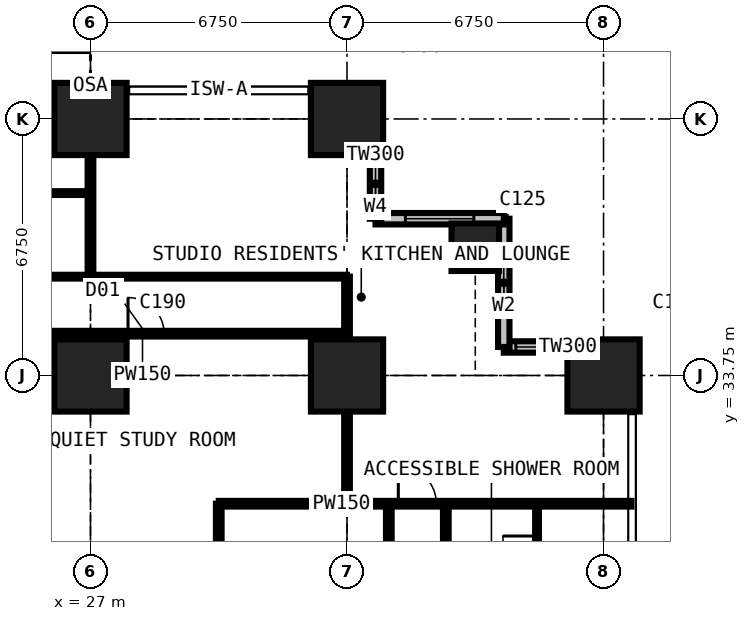
"""IFC4 building model, lengths in metres.
Left out: names, types, materials, properties, quantities, classifications, styles, units other than length and angle.
Written with IfcOpenShell. Run it as: python <this file> out.ifc"""

import sys

from ifc_helpers import new_model, si_unit, direction, frame, frame_2d, origin, origin_2d, place, context, subcontext, project, spatial, rectangle, extrude, element, fill, save


model = new_model("IFC4")
c1 = context("Model", 3, precision=1e-05, world=origin(), true_north=direction((0.0, 1.0)))
c2 = subcontext(c1, "Body", "Model", "MODEL_VIEW")
j1 = project(units=[si_unit("LENGTHUNIT", "METRE"), si_unit("PLANEANGLEUNIT", "RADIAN")], contexts=[c1])
p1 = place(None, origin())
s1 = spatial("IfcSite", under=j1, at=p1, CompositionType="ELEMENT")
p2 = place(p1, origin())
s2 = spatial("IfcBuilding", under=s1, at=p2, CompositionType="ELEMENT")
p3 = place(p2, frame((0.0, 0.0, 39.6)))
s3 = spatial("IfcBuildingStorey", under=s2, at=p3, CompositionType="ELEMENT", Elevation=39.6)
for number, where, z_axis, x_axis in (
    (1, (27.0, 33.75, 0.0), (0.0, 0.0, 1.0), (1.0, 0.0, 0.0)),
    (2, (27.0, 40.5, 0.0), (0.0, 0.0, 1.0), (1.0, 0.0, 0.0)),
    (3, (33.75, 33.75, 0.0), (0.0, 0.0, 1.0), (1.0, 0.0, 0.0)),
    (4, (33.75, 40.5, 0.0), (0.0, 0.0, 1.0), (1.0, 0.0, 0.0)),
):
    element("IfcColumn", number, at=place(p3, frame(where, z_axis=z_axis, x_axis=x_axis)), inside=s3, PredefinedType="COLUMN", context=c2, shape_type="SweptSolid", body=[
        extrude(rectangle(XDim=1.9, YDim=1.9, at=origin_2d()), origin(), (0.0, 0.0, 1.0), 3.6),
    ])
p4 = place(p3, frame((37.125, 37.125, 0.0), z_axis=(0.0, 0.0, 1.0), x_axis=(1.0, 0.0, 0.0)))
e5 = element("IfcColumn", 5, at=p4, inside=s3, PredefinedType="COLUMN", context=c2, shape_type="SweptSolid", body=[
    extrude(rectangle(XDim=1.25, YDim=1.25, at=origin_2d()), origin(), (0.0, 0.0, 1.0), 3.6),
])
p5 = place(p3, frame((40.5, 33.75, 0.0), z_axis=(0.0, 0.0, 1.0), x_axis=(1.0, 0.0, 0.0)))
e6 = element("IfcColumn", 6, at=p5, inside=s3, PredefinedType="COLUMN", context=c2, shape_type="SweptSolid", body=[
    extrude(rectangle(XDim=1.9, YDim=1.9, at=origin_2d()), origin(), (0.0, 0.0, 1.0), 3.6),
])
p6 = place(p3, frame((41.25, 34.5, 0.0), z_axis=(0.0, 0.0, 1.0), x_axis=(-1.0, 0.0, 0.0)))
e7 = element("IfcWall", 7, at=p6, inside=s3, PredefinedType="SOLIDWALL", context=c2, shape_type="SweptSolid", body=[
    extrude(rectangle(XDim=3.375, YDim=0.3, at=frame_2d((1.688, 0.0))), origin(), (0.0, 0.0, 1.0), 3.375),
])
p7 = place(p6, frame((1.857, 0.0, 0.9)))
e8 = element("IfcOpeningElement", 8, at=p7, cuts=e7, PredefinedType="OPENING", context=c2, shape_type="SweptSolid", body=[
    extrude(rectangle(XDim=1.2, YDim=1.8, at=frame_2d((0.6, 0.9))), frame((0.0, 0.16, 0.0), z_axis=(0.0, -1.0, 0.0), x_axis=(1.0, 0.0, 0.0)), (0.0, 0.0, 1.0), 0.32),
])
p8 = place(p3, frame((37.875, 34.5, 0.0), z_axis=(0.0, 0.0, 1.0), x_axis=(0.0, 1.0, 0.0)))
e9 = element("IfcWall", 9, at=p8, inside=s3, PredefinedType="SOLIDWALL", context=c2, shape_type="SweptSolid", body=[
    extrude(rectangle(XDim=3.375, YDim=0.3, at=frame_2d((1.688, 0.0))), origin(), (0.0, 0.0, 1.0), 3.375),
])
p9 = place(p8, frame((0.788, 0.0, 0.6)))
e10 = element("IfcOpeningElement", 10, at=p9, cuts=e9, PredefinedType="OPENING", context=c2, shape_type="SweptSolid", body=[
    extrude(rectangle(XDim=1.8, YDim=2.1, at=frame_2d((0.9, 1.05))), frame((0.0, 0.16, 0.0), z_axis=(0.0, -1.0, 0.0), x_axis=(1.0, 0.0, 0.0)), (0.0, 0.0, 1.0), 0.32),
])
p10 = place(p3, frame((37.875, 37.875, 0.0), z_axis=(0.0, 0.0, 1.0), x_axis=(-1.0, 0.0, 0.0)))
e11 = element("IfcWall", 11, at=p10, inside=s3, PredefinedType="SOLIDWALL", context=c2, shape_type="SweptSolid", body=[
    extrude(rectangle(XDim=3.375, YDim=0.3, at=frame_2d((1.688, 0.0))), origin(), (0.0, 0.0, 1.0), 3.375),
])
p11 = place(p10, frame((0.788, 0.0, 0.6)))
e12 = element("IfcOpeningElement", 12, at=p11, cuts=e11, PredefinedType="OPENING", context=c2, shape_type="SweptSolid", body=[
    extrude(rectangle(XDim=1.8, YDim=2.1, at=frame_2d((0.9, 1.05))), frame((0.0, 0.16, 0.0), z_axis=(0.0, -1.0, 0.0), x_axis=(1.0, 0.0, 0.0)), (0.0, 0.0, 1.0), 0.32),
])
p12 = place(p3, frame((34.5, 37.875, 0.0), z_axis=(0.0, 0.0, 1.0), x_axis=(0.0, 1.0, 0.0)))
e13 = element("IfcWall", 13, at=p12, inside=s3, PredefinedType="SOLIDWALL", context=c2, shape_type="SweptSolid", body=[
    extrude(rectangle(XDim=3.375, YDim=0.3, at=frame_2d((1.688, 0.0))), origin(), (0.0, 0.0, 1.0), 3.375),
])
p13 = place(p12, frame((0.317, 0.0, 0.9)))
e14 = element("IfcOpeningElement", 14, at=p13, cuts=e13, PredefinedType="OPENING", context=c2, shape_type="SweptSolid", body=[
    extrude(rectangle(XDim=1.2, YDim=1.8, at=frame_2d((0.6, 0.9))), frame((0.0, 0.16, 0.0), z_axis=(0.0, -1.0, 0.0), x_axis=(1.0, 0.0, 0.0)), (0.0, 0.0, 1.0), 0.32),
])
p14 = place(p3, frame((10.125, 36.35, 0.0), z_axis=(0.0, 0.0, 1.0), x_axis=(1.0, 0.0, 0.0)))
e15 = element("IfcWall", 15, at=p14, inside=s3, PredefinedType="PARTITIONING", context=c2, shape_type="SweptSolid", body=[
    extrude(rectangle(XDim=23.625, YDim=0.1, at=frame_2d((11.812, 0.0))), origin(), (0.0, 0.0, 1.0), 3.375),
])
p15 = place(p14, frame((0.2, 0.0, 0.0)))
e16 = element("IfcOpeningElement", 16, at=p15, cuts=e15, PredefinedType="OPENING", context=c2, shape_type="SweptSolid", body=[
    extrude(rectangle(XDim=0.95, YDim=2.2, at=frame_2d((0.475, 1.1))), frame((0.0, 0.06, 0.0), z_axis=(0.0, -1.0, 0.0), x_axis=(1.0, 0.0, 0.0)), (0.0, 0.0, 1.0), 0.12),
])
p16 = place(p14, frame((3.625, 0.0, 0.0)))
e17 = element("IfcOpeningElement", 17, at=p16, cuts=e15, PredefinedType="OPENING", context=c2, shape_type="SweptSolid", body=[
    extrude(rectangle(XDim=0.95, YDim=2.2, at=frame_2d((0.475, 1.1))), frame((0.0, 0.06, 0.0), z_axis=(0.0, -1.0, 0.0), x_axis=(1.0, 0.0, 0.0)), (0.0, 0.0, 1.0), 0.12),
])
p17 = place(p14, frame((7.0, 0.0, 0.0)))
e18 = element("IfcOpeningElement", 18, at=p17, cuts=e15, PredefinedType="OPENING", context=c2, shape_type="SweptSolid", body=[
    extrude(rectangle(XDim=0.95, YDim=2.2, at=frame_2d((0.475, 1.1))), frame((0.0, 0.06, 0.0), z_axis=(0.0, -1.0, 0.0), x_axis=(1.0, 0.0, 0.0)), (0.0, 0.0, 1.0), 0.12),
])
p18 = place(p14, frame((10.375, 0.0, 0.0)))
e19 = element("IfcOpeningElement", 19, at=p18, cuts=e15, PredefinedType="OPENING", context=c2, shape_type="SweptSolid", body=[
    extrude(rectangle(XDim=0.95, YDim=2.2, at=frame_2d((0.475, 1.1))), frame((0.0, 0.06, 0.0), z_axis=(0.0, -1.0, 0.0), x_axis=(1.0, 0.0, 0.0)), (0.0, 0.0, 1.0), 0.12),
])
p19 = place(p14, frame((13.75, 0.0, 0.0)))
e20 = element("IfcOpeningElement", 20, at=p19, cuts=e15, PredefinedType="OPENING", context=c2, shape_type="SweptSolid", body=[
    extrude(rectangle(XDim=0.95, YDim=2.2, at=frame_2d((0.475, 1.1))), frame((0.0, 0.06, 0.0), z_axis=(0.0, -1.0, 0.0), x_axis=(1.0, 0.0, 0.0)), (0.0, 0.0, 1.0), 0.12),
])
p20 = place(p3, frame((22.988, 34.85, 0.0), z_axis=(0.0, 0.0, 1.0), x_axis=(1.0, 0.0, 0.0)))
e21 = element("IfcWall", 21, at=p20, inside=s3, PredefinedType="PARTITIONING", context=c2, shape_type="SweptSolid", body=[
    extrude(rectangle(XDim=10.762, YDim=0.15, at=frame_2d((5.381, 0.0))), origin(), (0.0, 0.0, 1.0), 3.375),
])
p21 = place(p20, frame((5.0, 0.0, 0.0)))
e22 = element("IfcOpeningElement", 22, at=p21, cuts=e21, PredefinedType="OPENING", context=c2, shape_type="SweptSolid", body=[
    extrude(rectangle(XDim=0.95, YDim=2.2, at=frame_2d((0.475, 1.1))), frame((0.0, 0.085, 0.0), z_axis=(0.0, -1.0, 0.0), x_axis=(1.0, 0.0, 0.0)), (0.0, 0.0, 1.0), 0.17),
])
p22 = place(p3, frame((25.0, 38.55, 0.0), z_axis=(0.0, 0.0, 1.0), x_axis=(1.0, 0.0, 0.0)))
e23 = element("IfcWall", 23, at=p22, inside=s3, PredefinedType="PARTITIONING", context=c2, shape_type="SweptSolid", body=[
    extrude(rectangle(XDim=2.0, YDim=0.1, at=frame_2d((1.0, 0.0))), origin(), (0.0, 0.0, 1.0), 3.375),
])
p23 = place(p3, frame((27.0, 36.35, 0.0), z_axis=(0.0, 0.0, 1.0), x_axis=(0.0, 1.0, 0.0)))
e24 = element("IfcWall", 24, at=p23, inside=s3, PredefinedType="PARTITIONING", context=c2, shape_type="SweptSolid", body=[
    extrude(rectangle(XDim=4.884, YDim=0.15, at=frame_2d((2.442, 0.0))), origin(), (0.0, 0.0, 1.0), 2.61),
])
p24 = place(p3, frame((30.375, 29.2, 0.0), z_axis=(0.0, 0.0, 1.0), x_axis=(0.0, 1.0, 0.0)))
e25 = element("IfcWall", 25, at=p24, inside=s3, PredefinedType="PARTITIONING", context=c2, shape_type="SweptSolid", body=[
    extrude(rectangle(XDim=1.175, YDim=0.15, at=frame_2d((0.587, 0.0))), origin(), (0.0, 0.0, 1.0), 3.375),
])
p25 = place(p3, frame((30.375, 30.375, 0.0), z_axis=(0.0, 0.0, 1.0), x_axis=(1.0, 0.0, 0.0)))
e26 = element("IfcWall", 26, at=p25, inside=s3, PredefinedType="PARTITIONING", context=c2, shape_type="SweptSolid", body=[
    extrude(rectangle(XDim=10.859, YDim=0.15, at=frame_2d((5.429, 0.0))), origin(), (0.0, 0.0, 1.0), 3.375),
])
p26 = place(p25, frame((4.725, 0.0, 0.0)))
e27 = element("IfcOpeningElement", 27, at=p26, cuts=e26, PredefinedType="OPENING", context=c2, shape_type="SweptSolid", body=[
    extrude(rectangle(XDim=1.0, YDim=2.2, at=frame_2d((0.5, 1.1))), frame((0.0, 0.085, 0.0), z_axis=(0.0, -1.0, 0.0), x_axis=(1.0, 0.0, 0.0)), (0.0, 0.0, 1.0), 0.17),
])
p27 = place(p3, frame((33.75, 30.375, 0.0), z_axis=(0.0, 0.0, 1.0), x_axis=(0.0, 1.0, 0.0)))
e28 = element("IfcWall", 28, at=p27, inside=s3, PredefinedType="PARTITIONING", context=c2, shape_type="SweptSolid", body=[
    extrude(rectangle(XDim=5.975, YDim=0.15, at=frame_2d((2.988, 0.0))), origin(), (0.0, 0.0, 1.0), 2.877),
])
p28 = place(p3, frame((34.85, 12.55, 0.0), z_axis=(0.0, 0.0, 1.0), x_axis=(0.0, 1.0, 0.0)))
e29 = element("IfcWall", 29, at=p28, inside=s3, PredefinedType="PARTITIONING", context=c2, shape_type="SweptSolid", body=[
    extrude(rectangle(XDim=17.825, YDim=0.15, at=frame_2d((8.913, 0.0))), origin(), (0.0, 0.0, 1.0), 3.375),
])
p29 = place(p28, frame((8.65, 0.0, 0.0)))
e30 = element("IfcOpeningElement", 30, at=p29, cuts=e29, PredefinedType="OPENING", context=c2, shape_type="SweptSolid", body=[
    extrude(rectangle(XDim=0.95, YDim=2.2, at=frame_2d((0.475, 1.1))), frame((0.0, 0.085, 0.0), z_axis=(0.0, -1.0, 0.0), x_axis=(1.0, 0.0, 0.0)), (0.0, 0.0, 1.0), 0.17),
])
p30 = place(p3, frame((36.35, 6.75, 0.0), z_axis=(0.0, 0.0, 1.0), x_axis=(0.0, 1.0, 0.0)))
e31 = element("IfcWall", 31, at=p30, inside=s3, PredefinedType="PARTITIONING", context=c2, shape_type="SweptSolid", body=[
    extrude(rectangle(XDim=23.625, YDim=0.15, at=frame_2d((11.812, 0.0))), origin(), (0.0, 0.0, 1.0), 3.375),
])
p31 = place(p30, frame((18.475, 0.0, 0.0)))
e32 = element("IfcOpeningElement", 32, at=p31, cuts=e31, PredefinedType="OPENING", context=c2, shape_type="SweptSolid", body=[
    extrude(rectangle(XDim=0.95, YDim=2.2, at=frame_2d((0.475, 1.1))), frame((0.0, 0.085, 0.0), z_axis=(0.0, -1.0, 0.0), x_axis=(1.0, 0.0, 0.0)), (0.0, 0.0, 1.0), 0.17),
])
p32 = place(p30, frame((11.725, 0.0, 0.0)))
e33 = element("IfcOpeningElement", 33, at=p32, cuts=e31, PredefinedType="OPENING", context=c2, shape_type="SweptSolid", body=[
    extrude(rectangle(XDim=0.95, YDim=2.2, at=frame_2d((0.475, 1.1))), frame((0.0, 0.085, 0.0), z_axis=(0.0, -1.0, 0.0), x_axis=(1.0, 0.0, 0.0)), (0.0, 0.0, 1.0), 0.17),
])
p33 = place(p30, frame((6.95, 0.0, 0.0)))
e34 = element("IfcOpeningElement", 34, at=p33, cuts=e31, PredefinedType="OPENING", context=c2, shape_type="SweptSolid", body=[
    extrude(rectangle(XDim=0.95, YDim=2.2, at=frame_2d((0.475, 1.1))), frame((0.0, 0.085, 0.0), z_axis=(0.0, -1.0, 0.0), x_axis=(1.0, 0.0, 0.0)), (0.0, 0.0, 1.0), 0.17),
])
p34 = place(p3, frame((38.75, 27.775, 0.0), z_axis=(0.0, 0.0, 1.0), x_axis=(0.0, 1.0, 0.0)))
e35 = element("IfcWall", 35, at=p34, inside=s3, PredefinedType="PARTITIONING", context=c2, shape_type="SweptSolid", body=[
    extrude(rectangle(XDim=2.6, YDim=0.1, at=frame_2d((1.3, 0.0))), origin(), (0.0, 0.0, 1.0), 3.375),
])
p35 = place(p34, frame((0.85, 0.0, 0.0)))
e36 = element("IfcOpeningElement", 36, at=p35, cuts=e35, PredefinedType="OPENING", context=c2, shape_type="SweptSolid", body=[
    extrude(rectangle(XDim=0.9, YDim=2.2, at=frame_2d((0.45, 1.1))), frame((0.0, 0.06, 0.0), z_axis=(0.0, -1.0, 0.0), x_axis=(1.0, 0.0, 0.0)), (0.0, 0.0, 1.0), 0.12),
])
p36 = place(p7, origin())
e37 = element("IfcWindow", 37, at=p36, inside=s3, PartitioningType="SINGLE_PANEL", PredefinedType="WINDOW", context=c2, shape_type="SweptSolid", body=[
    extrude(rectangle(XDim=1.2, YDim=1.8, at=frame_2d((0.6, 0.9))), frame((0.0, 0.03, 0.0), z_axis=(0.0, -1.0, 0.0), x_axis=(1.0, 0.0, 0.0)), (0.0, 0.0, 1.0), 0.06),
])
fill(e8, e37)
p37 = place(p9, origin())
e38 = element("IfcWindow", 38, at=p37, inside=s3, PartitioningType="SINGLE_PANEL", PredefinedType="WINDOW", context=c2, shape_type="SweptSolid", body=[
    extrude(rectangle(XDim=1.8, YDim=2.1, at=frame_2d((0.9, 1.05))), frame((0.0, 0.03, 0.0), z_axis=(0.0, -1.0, 0.0), x_axis=(1.0, 0.0, 0.0)), (0.0, 0.0, 1.0), 0.06),
])
fill(e10, e38)
p38 = place(p11, origin())
e39 = element("IfcWindow", 39, at=p38, inside=s3, PartitioningType="SINGLE_PANEL", PredefinedType="WINDOW", context=c2, shape_type="SweptSolid", body=[
    extrude(rectangle(XDim=1.8, YDim=2.1, at=frame_2d((0.9, 1.05))), frame((0.0, 0.03, 0.0), z_axis=(0.0, -1.0, 0.0), x_axis=(1.0, 0.0, 0.0)), (0.0, 0.0, 1.0), 0.06),
])
fill(e12, e39)
p39 = place(p13, origin())
e40 = element("IfcWindow", 40, at=p39, inside=s3, PartitioningType="SINGLE_PANEL", PredefinedType="WINDOW", context=c2, shape_type="SweptSolid", body=[
    extrude(rectangle(XDim=1.2, YDim=1.8, at=frame_2d((0.6, 0.9))), frame((0.0, 0.03, 0.0), z_axis=(0.0, -1.0, 0.0), x_axis=(1.0, 0.0, 0.0)), (0.0, 0.0, 1.0), 0.06),
])
fill(e14, e40)
p40 = place(p35, origin())
e41 = element("IfcDoor", 41, at=p40, inside=s3, OperationType="SINGLE_SWING_RIGHT", PredefinedType="DOOR", context=c2, shape_type="SweptSolid", body=[
    extrude(rectangle(XDim=0.9, YDim=2.2, at=frame_2d((0.45, 1.1))), frame((0.0, 0.025, 0.0), z_axis=(0.0, -1.0, 0.0), x_axis=(1.0, 0.0, 0.0)), (0.0, 0.0, 1.0), 0.05),
])
fill(e36, e41)
p41 = place(p26, origin())
e42 = element("IfcDoor", 42, at=p41, inside=s3, OperationType="SINGLE_SWING_LEFT", PredefinedType="DOOR", context=c2, shape_type="SweptSolid", body=[
    extrude(rectangle(XDim=1.0, YDim=2.2, at=frame_2d((0.5, 1.1))), frame((0.0, 0.025, 0.0), z_axis=(0.0, -1.0, 0.0), x_axis=(1.0, 0.0, 0.0)), (0.0, 0.0, 1.0), 0.05),
])
fill(e27, e42)
p42 = place(p21, origin())
e43 = element("IfcDoor", 43, at=p42, inside=s3, OperationType="SINGLE_SWING_LEFT", PredefinedType="DOOR", context=c2, shape_type="SweptSolid", body=[
    extrude(rectangle(XDim=0.95, YDim=2.2, at=frame_2d((0.475, 1.1))), frame((0.0, 0.025, 0.0), z_axis=(0.0, -1.0, 0.0), x_axis=(1.0, 0.0, 0.0)), (0.0, 0.0, 1.0), 0.05),
])
fill(e22, e43)
save(model, sys.argv[1])
